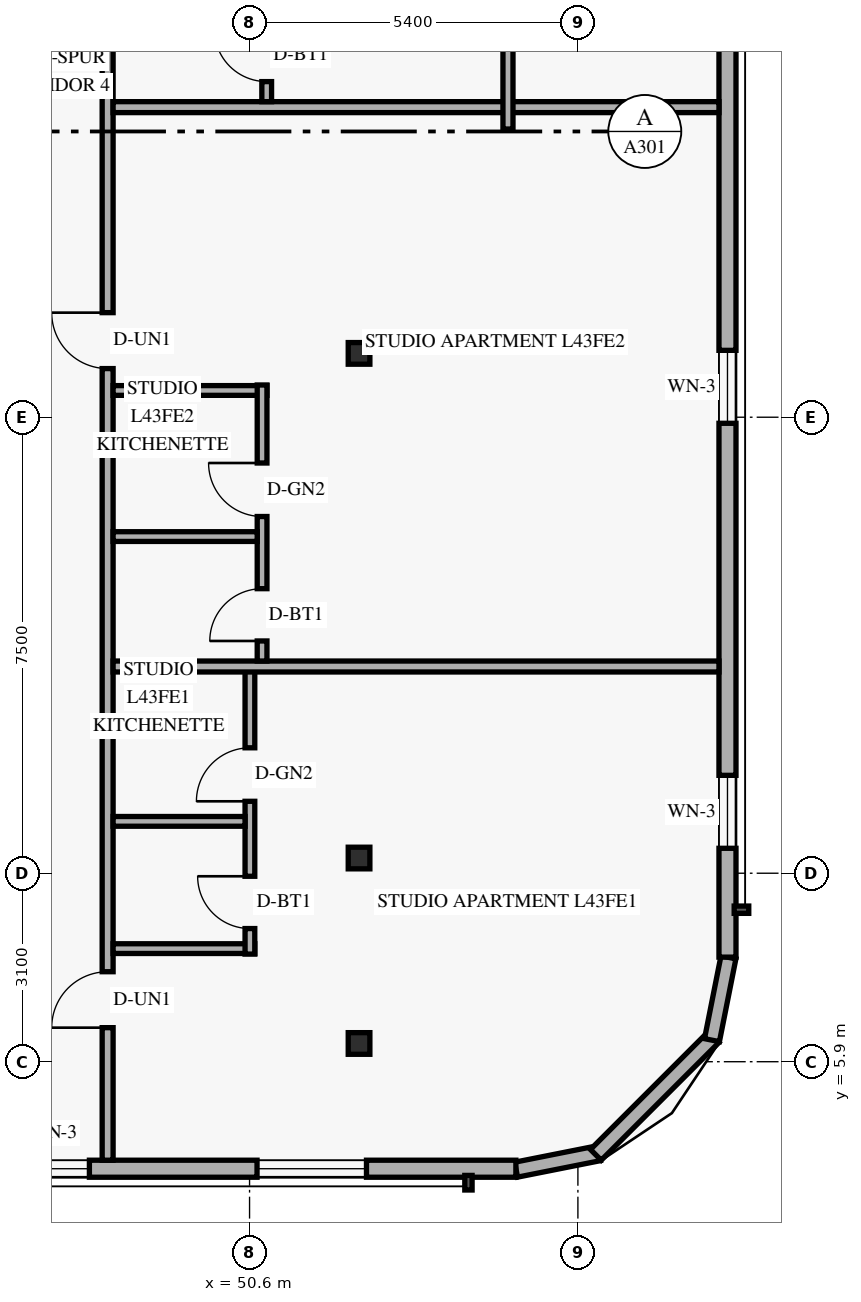
"""IFC4 building model, lengths in metres.
Left out: names, types, materials, properties, quantities, classifications, styles, units other than length and angle.
Written with IfcOpenShell. Run it as: python <this file> out.ifc"""

import sys

from ifc_helpers import new_model, si_unit, direction, frame, frame_2d, origin, origin_2d, place, context, subcontext, project, spatial, rectangle, hollow_rectangle, extrude, element, fill, save


model = new_model("IFC4")
c1 = context("Model", 3, precision=1e-05, world=origin(), true_north=direction((0.0, 1.0)))
c2 = subcontext(c1, "Body", "Model", "MODEL_VIEW")
j1 = project(units=[si_unit("LENGTHUNIT", "METRE"), si_unit("PLANEANGLEUNIT", "RADIAN")], contexts=[c1])
p1 = place(None, origin())
s1 = spatial("IfcSite", under=j1, at=p1, CompositionType="ELEMENT")
p2 = place(p1, origin())
s2 = spatial("IfcBuilding", under=s1, at=p2, CompositionType="ELEMENT")
p3 = place(p2, frame((0.0, 0.0, 166.2)))
s3 = spatial("IfcBuildingStorey", under=s2, at=p3, CompositionType="ELEMENT", Elevation=166.2)
for number, where, z_axis, x_axis in (
    (1, (52.296, 6.2, 0.0), (0.058, 0.0, 0.998), (0.0, 1.0, 0.0)),
    (2, (52.296, 9.25, 0.0), (0.058, 0.0, 0.998), (0.0, 1.0, 0.0)),
    (3, (52.296, 17.55, 0.0), (0.058, 0.0, 0.998), (0.0, 1.0, 0.0)),
):
    element("IfcColumn", number, at=place(p3, frame(where, z_axis=z_axis, x_axis=x_axis)), inside=s3, PredefinedType="COLUMN", context=c2, shape_type="SweptSolid", body=[
        extrude(hollow_rectangle(XDim=0.356, YDim=0.356, WallThickness=0.016, at=origin_2d()), origin(), (0.0, 0.0, 1.0), 3.606),
    ])
p4 = place(p3, frame((54.983, 4.124, 0.0), z_axis=(0.0, 0.0, 1.0), x_axis=(0.980809899341, 0.19496651342, 0.0)))
e4 = element("IfcWall", 4, at=p4, inside=s3, PredefinedType="SOLIDWALL", context=c2, shape_type="SweptSolid", body=[
    extrude(rectangle(XDim=1.389, YDim=0.25, at=frame_2d((0.694, 0.0))), origin(), (0.0, 0.0, 1.0), 3.36),
])
p5 = place(p3, frame((56.295, 4.368, 0.0), z_axis=(0.0, 0.0, 1.0), x_axis=(0.707106781187, 0.707106781187, 0.0)))
e5 = element("IfcWall", 5, at=p5, inside=s3, PredefinedType="SOLIDWALL", context=c2, shape_type="SweptSolid", body=[
    extrude(rectangle(XDim=2.739, YDim=0.25, at=frame_2d((1.37, 0.0))), origin(), (0.0, 0.0, 1.0), 3.36),
])
p6 = place(p3, frame((58.205, 6.254, 0.0), z_axis=(0.0, 0.0, 1.0), x_axis=(0.19496651342, 0.980809899341, 0.0)))
e6 = element("IfcWall", 6, at=p6, inside=s3, PredefinedType="SOLIDWALL", context=c2, shape_type="SweptSolid", body=[
    extrude(rectangle(XDim=1.389, YDim=0.25, at=frame_2d((0.694, 0.0))), origin(), (0.0, 0.0, 1.0), 3.36),
])
p7 = place(p3, frame((21.22, 4.14, 0.0), z_axis=(0.0, 0.0, 1.0), x_axis=(1.0, 0.0, 0.0)))
e7 = element("IfcWall", 7, at=p7, inside=s3, PredefinedType="SOLIDWALL", context=c2, shape_type="SweptSolid", body=[
    extrude(rectangle(XDim=33.76, YDim=0.28, at=frame_2d((16.88, 0.0))), origin(), (0.0, 0.0, 1.0), 3.36),
])
p8 = place(p7, frame((2.255, 0.0, 0.85)))
e8 = element("IfcOpeningElement", 8, at=p8, cuts=e7, PredefinedType="OPENING", context=c2, shape_type="SweptSolid", body=[
    extrude(rectangle(XDim=1.8, YDim=1.6, at=frame_2d((0.9, 0.8))), frame((0.0, 0.15, 0.0), z_axis=(0.0, -1.0, 0.0), x_axis=(1.0, 0.0, 0.0)), (0.0, 0.0, 1.0), 0.3),
])
p9 = place(p7, frame((9.14, 0.0, 0.85)))
e9 = element("IfcOpeningElement", 9, at=p9, cuts=e7, PredefinedType="OPENING", context=c2, shape_type="SweptSolid", body=[
    extrude(rectangle(XDim=1.8, YDim=1.6, at=frame_2d((0.9, 0.8))), frame((0.0, 0.15, 0.0), z_axis=(0.0, -1.0, 0.0), x_axis=(1.0, 0.0, 0.0)), (0.0, 0.0, 1.0), 0.3),
])
p10 = place(p7, frame((14.565, 0.0, 0.85)))
e10 = element("IfcOpeningElement", 10, at=p10, cuts=e7, PredefinedType="OPENING", context=c2, shape_type="SweptSolid", body=[
    extrude(rectangle(XDim=1.8, YDim=1.6, at=frame_2d((0.9, 0.8))), frame((0.0, 0.15, 0.0), z_axis=(0.0, -1.0, 0.0), x_axis=(1.0, 0.0, 0.0)), (0.0, 0.0, 1.0), 0.3),
])
p11 = place(p7, frame((20.088, 0.0, 0.85)))
e11 = element("IfcOpeningElement", 11, at=p11, cuts=e7, PredefinedType="OPENING", context=c2, shape_type="SweptSolid", body=[
    extrude(rectangle(XDim=1.8, YDim=1.6, at=frame_2d((0.9, 0.8))), frame((0.0, 0.15, 0.0), z_axis=(0.0, -1.0, 0.0), x_axis=(1.0, 0.0, 0.0)), (0.0, 0.0, 1.0), 0.3),
])
p12 = place(p7, frame((25.546, 0.0, 0.85)))
e12 = element("IfcOpeningElement", 12, at=p12, cuts=e7, PredefinedType="OPENING", context=c2, shape_type="SweptSolid", body=[
    extrude(rectangle(XDim=1.2, YDim=1.5, at=frame_2d((0.6, 0.75))), frame((0.0, 0.15, 0.0), z_axis=(0.0, -1.0, 0.0), x_axis=(1.0, 0.0, 0.0)), (0.0, 0.0, 1.0), 0.3),
])
p13 = place(p7, frame((29.503, 0.0, 0.85)))
e13 = element("IfcOpeningElement", 13, at=p13, cuts=e7, PredefinedType="OPENING", context=c2, shape_type="SweptSolid", body=[
    extrude(rectangle(XDim=1.8, YDim=1.6, at=frame_2d((0.9, 0.8))), frame((0.0, 0.15, 0.0), z_axis=(0.0, -1.0, 0.0), x_axis=(1.0, 0.0, 0.0)), (0.0, 0.0, 1.0), 0.3),
])
p14 = place(p3, frame((58.46, 7.62, 0.0), z_axis=(0.0, 0.0, 1.0), x_axis=(0.0, 1.0, 0.0)))
e14 = element("IfcWall", 14, at=p14, inside=s3, PredefinedType="SOLIDWALL", context=c2, shape_type="SweptSolid", body=[
    extrude(rectangle(XDim=32.76, YDim=0.28, at=frame_2d((16.38, 0.0))), origin(), (0.0, 0.0, 1.0), 3.36),
])
p15 = place(p14, frame((1.79, 0.0, 0.85)))
e15 = element("IfcOpeningElement", 15, at=p15, cuts=e14, PredefinedType="OPENING", context=c2, shape_type="SweptSolid", body=[
    extrude(rectangle(XDim=1.2, YDim=1.5, at=frame_2d((0.6, 0.75))), frame((0.0, 0.15, 0.0), z_axis=(0.0, -1.0, 0.0), x_axis=(1.0, 0.0, 0.0)), (0.0, 0.0, 1.0), 0.3),
])
p16 = place(p14, frame((8.78, 0.0, 0.85)))
e16 = element("IfcOpeningElement", 16, at=p16, cuts=e14, PredefinedType="OPENING", context=c2, shape_type="SweptSolid", body=[
    extrude(rectangle(XDim=1.2, YDim=1.5, at=frame_2d((0.6, 0.75))), frame((0.0, 0.15, 0.0), z_axis=(0.0, -1.0, 0.0), x_axis=(1.0, 0.0, 0.0)), (0.0, 0.0, 1.0), 0.3),
])
p17 = place(p14, frame((16.325, 0.0, 0.85)))
e17 = element("IfcOpeningElement", 17, at=p17, cuts=e14, PredefinedType="OPENING", context=c2, shape_type="SweptSolid", body=[
    extrude(rectangle(XDim=1.2, YDim=1.5, at=frame_2d((0.6, 0.75))), frame((0.0, 0.15, 0.0), z_axis=(0.0, -1.0, 0.0), x_axis=(1.0, 0.0, 0.0)), (0.0, 0.0, 1.0), 0.3),
])
p18 = place(p14, frame((21.325, 0.0, 0.85)))
e18 = element("IfcOpeningElement", 18, at=p18, cuts=e14, PredefinedType="OPENING", context=c2, shape_type="SweptSolid", body=[
    extrude(rectangle(XDim=1.2, YDim=1.5, at=frame_2d((0.6, 0.75))), frame((0.0, 0.15, 0.0), z_axis=(0.0, -1.0, 0.0), x_axis=(1.0, 0.0, 0.0)), (0.0, 0.0, 1.0), 0.3),
])
p19 = place(p14, frame((26.58, 0.0, 0.85)))
e19 = element("IfcOpeningElement", 19, at=p19, cuts=e14, PredefinedType="OPENING", context=c2, shape_type="SweptSolid", body=[
    extrude(rectangle(XDim=1.2, YDim=1.5, at=frame_2d((0.6, 0.75))), frame((0.0, 0.15, 0.0), z_axis=(0.0, -1.0, 0.0), x_axis=(1.0, 0.0, 0.0)), (0.0, 0.0, 1.0), 0.3),
])
p20 = place(p14, frame((30.97, 0.0, 0.85)))
e20 = element("IfcOpeningElement", 20, at=p20, cuts=e14, PredefinedType="OPENING", context=c2, shape_type="SweptSolid", body=[
    extrude(rectangle(XDim=1.2, YDim=1.5, at=frame_2d((0.6, 0.75))), frame((0.0, 0.15, 0.0), z_axis=(0.0, -1.0, 0.0), x_axis=(1.0, 0.0, 0.0)), (0.0, 0.0, 1.0), 0.3),
])
p21 = place(p3, frame((48.266, 4.28, 0.0), z_axis=(0.0, 0.0, 1.0), x_axis=(0.0, 1.0, 0.0)))
e21 = element("IfcWall", 21, at=p21, inside=s3, PredefinedType="STANDARD", context=c2, shape_type="SweptSolid", body=[
    extrude(rectangle(XDim=39.44, YDim=0.18, at=frame_2d((19.72, 0.0))), origin(), (0.0, 0.0, 1.0), 2.73),
])
p22 = place(p21, frame((2.18, 0.0, 0.0)))
e22 = element("IfcOpeningElement", 22, at=p22, cuts=e21, PredefinedType="OPENING", context=c2, shape_type="SweptSolid", body=[
    extrude(rectangle(XDim=0.92, YDim=2.15, at=frame_2d((0.46, 1.075))), frame((0.0, 0.1, 0.0), z_axis=(0.0, -1.0, 0.0), x_axis=(1.0, 0.0, 0.0)), (0.0, 0.0, 1.0), 0.2),
])
p23 = place(p21, frame((13.02, 0.0, 0.0)))
e23 = element("IfcOpeningElement", 23, at=p23, cuts=e21, PredefinedType="OPENING", context=c2, shape_type="SweptSolid", body=[
    extrude(rectangle(XDim=0.92, YDim=2.15, at=frame_2d((0.46, 1.075))), frame((0.0, 0.1, 0.0), z_axis=(0.0, -1.0, 0.0), x_axis=(1.0, 0.0, 0.0)), (0.0, 0.0, 1.0), 0.2),
])
p24 = place(p21, frame((22.32, 0.0, 0.0)))
e24 = element("IfcOpeningElement", 24, at=p24, cuts=e21, PredefinedType="OPENING", context=c2, shape_type="SweptSolid", body=[
    extrude(rectangle(XDim=0.92, YDim=2.15, at=frame_2d((0.46, 1.075))), frame((0.0, 0.1, 0.0), z_axis=(0.0, -1.0, 0.0), x_axis=(1.0, 0.0, 0.0)), (0.0, 0.0, 1.0), 0.2),
])
p25 = place(p21, frame((32.12, 0.0, 0.0)))
e25 = element("IfcOpeningElement", 25, at=p25, cuts=e21, PredefinedType="OPENING", context=c2, shape_type="SweptSolid", body=[
    extrude(rectangle(XDim=0.92, YDim=2.15, at=frame_2d((0.46, 1.075))), frame((0.0, 0.1, 0.0), z_axis=(0.0, -1.0, 0.0), x_axis=(1.0, 0.0, 0.0)), (0.0, 0.0, 1.0), 0.2),
])
p26 = place(p21, frame((38.2, 0.0, 0.0)))
e26 = element("IfcOpeningElement", 26, at=p26, cuts=e21, PredefinedType="OPENING", context=c2, shape_type="SweptSolid", body=[
    extrude(rectangle(XDim=0.92, YDim=2.15, at=frame_2d((0.46, 1.075))), frame((0.0, 0.1, 0.0), z_axis=(0.0, -1.0, 0.0), x_axis=(1.0, 0.0, 0.0)), (0.0, 0.0, 1.0), 0.2),
])
p27 = place(p3, frame((48.356, 7.76, 0.0), z_axis=(0.0, 0.0, 1.0), x_axis=(1.0, 0.0, 0.0)))
e27 = element("IfcWall", 27, at=p27, inside=s3, PredefinedType="PLUMBINGWALL", context=c2, shape_type="SweptSolid", body=[
    extrude(rectangle(XDim=2.33, YDim=0.16, at=frame_2d((1.165, 0.0))), origin(), (0.0, 0.0, 1.0), 3.36),
])
p28 = place(p3, frame((50.606, 7.67, 0.0), z_axis=(0.0, 0.0, 1.0), x_axis=(0.0, 1.0, 0.0)))
e28 = element("IfcWall", 28, at=p28, inside=s3, PredefinedType="PLUMBINGWALL", context=c2, shape_type="SweptSolid", body=[
    extrude(rectangle(XDim=4.73, YDim=0.16, at=frame_2d((2.365, 0.0))), origin(), (0.0, 0.0, 1.0), 2.73),
])
p29 = place(p28, frame((0.42, 0.0, 0.0)))
e29 = element("IfcOpeningElement", 29, at=p29, cuts=e28, PredefinedType="OPENING", context=c2, shape_type="SweptSolid", body=[
    extrude(rectangle(XDim=0.86, YDim=2.12, at=frame_2d((0.43, 1.06))), frame((0.0, 0.09, 0.0), z_axis=(0.0, -1.0, 0.0), x_axis=(1.0, 0.0, 0.0)), (0.0, 0.0, 1.0), 0.18),
])
p30 = place(p28, frame((2.513, 0.0, 0.0)))
e30 = element("IfcOpeningElement", 30, at=p30, cuts=e28, PredefinedType="OPENING", context=c2, shape_type="SweptSolid", body=[
    extrude(rectangle(XDim=0.88, YDim=2.12, at=frame_2d((0.44, 1.06))), frame((0.0, 0.09, 0.0), z_axis=(0.0, -1.0, 0.0), x_axis=(1.0, 0.0, 0.0)), (0.0, 0.0, 1.0), 0.18),
])
p31 = place(p3, frame((48.356, 9.853, 0.0), z_axis=(0.0, 0.0, 1.0), x_axis=(1.0, 0.0, 0.0)))
e31 = element("IfcWall", 31, at=p31, inside=s3, PredefinedType="PLUMBINGWALL", context=c2, shape_type="SweptSolid", body=[
    extrude(rectangle(XDim=2.17, YDim=0.16, at=frame_2d((1.085, 0.0))), origin(), (0.0, 0.0, 1.0), 3.36),
])
p32 = place(p3, frame((48.356, 12.4, 0.0), z_axis=(0.0, 0.0, 1.0), x_axis=(1.0, 0.0, 0.0)))
e32 = element("IfcWall", 32, at=p32, inside=s3, PredefinedType="PARTITIONING", context=c2, shape_type="SweptSolid", body=[
    extrude(rectangle(XDim=9.964, YDim=0.18, at=frame_2d((4.982, 0.0))), origin(), (0.0, 0.0, 1.0), 2.879),
])
p33 = place(p3, frame((48.356, 16.94, 0.0), z_axis=(0.0, 0.0, 1.0), x_axis=(1.0, 0.0, 0.0)))
e33 = element("IfcWall", 33, at=p33, inside=s3, PredefinedType="PLUMBINGWALL", context=c2, shape_type="SweptSolid", body=[
    extrude(rectangle(XDim=2.53, YDim=0.16, at=frame_2d((1.265, 0.0))), origin(), (0.0, 0.0, 1.0), 3.36),
])
p34 = place(p3, frame((50.806, 12.49, 0.0), z_axis=(0.0, 0.0, 1.0), x_axis=(0.0, 1.0, 0.0)))
e34 = element("IfcWall", 34, at=p34, inside=s3, PredefinedType="PLUMBINGWALL", context=c2, shape_type="SweptSolid", body=[
    extrude(rectangle(XDim=4.54, YDim=0.16, at=frame_2d((2.27, 0.0))), origin(), (0.0, 0.0, 1.0), 2.984),
])
p35 = place(p34, frame((0.33, 0.0, 0.0)))
e35 = element("IfcOpeningElement", 35, at=p35, cuts=e34, PredefinedType="OPENING", context=c2, shape_type="SweptSolid", body=[
    extrude(rectangle(XDim=0.86, YDim=2.12, at=frame_2d((0.43, 1.06))), frame((0.0, 0.09, 0.0), z_axis=(0.0, -1.0, 0.0), x_axis=(1.0, 0.0, 0.0)), (0.0, 0.0, 1.0), 0.18),
])
p36 = place(p34, frame((2.377, 0.0, 0.0)))
e36 = element("IfcOpeningElement", 36, at=p36, cuts=e34, PredefinedType="OPENING", context=c2, shape_type="SweptSolid", body=[
    extrude(rectangle(XDim=0.88, YDim=2.12, at=frame_2d((0.44, 1.06))), frame((0.0, 0.09, 0.0), z_axis=(0.0, -1.0, 0.0), x_axis=(1.0, 0.0, 0.0)), (0.0, 0.0, 1.0), 0.18),
])
p37 = place(p3, frame((48.356, 14.537, 0.0), z_axis=(0.0, 0.0, 1.0), x_axis=(1.0, 0.0, 0.0)))
e37 = element("IfcWall", 37, at=p37, inside=s3, PredefinedType="PLUMBINGWALL", context=c2, shape_type="SweptSolid", body=[
    extrude(rectangle(XDim=2.37, YDim=0.16, at=frame_2d((1.185, 0.0))), origin(), (0.0, 0.0, 1.0), 3.36),
])
p38 = place(p3, frame((48.356, 21.6, 0.0), z_axis=(0.0, 0.0, 1.0), x_axis=(1.0, 0.0, 0.0)))
e38 = element("IfcWall", 38, at=p38, inside=s3, PredefinedType="PARTITIONING", context=c2, shape_type="SweptSolid", body=[
    extrude(rectangle(XDim=9.964, YDim=0.18, at=frame_2d((4.982, 0.0))), origin(), (0.0, 0.0, 1.0), 2.879),
])
p39 = place(p3, frame((50.882, 21.69, 0.0), z_axis=(0.0, 0.0, 1.0), x_axis=(0.0, 1.0, 0.0)))
e39 = element("IfcWall", 39, at=p39, inside=s3, PredefinedType="PLUMBINGWALL", context=c2, shape_type="SweptSolid", body=[
    extrude(rectangle(XDim=4.64, YDim=0.16, at=frame_2d((2.32, 0.0))), origin(), (0.0, 0.0, 1.0), 3.36),
])
p40 = place(p39, frame((0.33, 0.0, 0.0)))
e40 = element("IfcOpeningElement", 40, at=p40, cuts=e39, PredefinedType="OPENING", context=c2, shape_type="SweptSolid", body=[
    extrude(rectangle(XDim=0.86, YDim=2.12, at=frame_2d((0.43, 1.06))), frame((0.0, 0.09, 0.0), z_axis=(0.0, -1.0, 0.0), x_axis=(1.0, 0.0, 0.0)), (0.0, 0.0, 1.0), 0.18),
])
p41 = place(p39, frame((2.423, 0.0, 0.0)))
e41 = element("IfcOpeningElement", 41, at=p41, cuts=e39, PredefinedType="OPENING", context=c2, shape_type="SweptSolid", body=[
    extrude(rectangle(XDim=0.88, YDim=2.12, at=frame_2d((0.44, 1.06))), frame((0.0, 0.09, 0.0), z_axis=(0.0, -1.0, 0.0), x_axis=(1.0, 0.0, 0.0)), (0.0, 0.0, 1.0), 0.18),
])
p42 = place(p3, frame((54.85, 21.24, 0.0), z_axis=(0.0, 0.0, 1.0), x_axis=(0.0, 1.0, 0.0)))
e42 = element("IfcWall", 42, at=p42, inside=s3, PredefinedType="PARTITIONING", context=c2, shape_type="SweptSolid", body=[
    extrude(rectangle(XDim=6.25, YDim=0.165, at=frame_2d((3.125, 0.0))), origin(), (0.0, 0.0, 1.0), 3.36),
])
p43 = place(p12, origin())
e43 = element("IfcWindow", 43, at=p43, inside=s3, PartitioningType="SINGLE_PANEL", PredefinedType="WINDOW", context=c2, shape_type="SweptSolid", body=[
    extrude(rectangle(XDim=1.2, YDim=1.5, at=frame_2d((0.6, 0.75))), frame((0.0, 0.03, 0.0), z_axis=(0.0, -1.0, 0.0), x_axis=(1.0, 0.0, 0.0)), (0.0, 0.0, 1.0), 0.06),
])
fill(e12, e43)
p44 = place(p13, origin())
e44 = element("IfcWindow", 44, at=p44, inside=s3, PartitioningType="SINGLE_PANEL", PredefinedType="WINDOW", context=c2, shape_type="SweptSolid", body=[
    extrude(rectangle(XDim=1.8, YDim=1.6, at=frame_2d((0.9, 0.8))), frame((0.0, 0.03, 0.0), z_axis=(0.0, -1.0, 0.0), x_axis=(1.0, 0.0, 0.0)), (0.0, 0.0, 1.0), 0.06),
])
fill(e13, e44)
p45 = place(p15, origin())
e45 = element("IfcWindow", 45, at=p45, inside=s3, PartitioningType="SINGLE_PANEL", PredefinedType="WINDOW", context=c2, shape_type="SweptSolid", body=[
    extrude(rectangle(XDim=1.2, YDim=1.5, at=frame_2d((0.6, 0.75))), frame((0.0, 0.03, 0.0), z_axis=(0.0, -1.0, 0.0), x_axis=(1.0, 0.0, 0.0)), (0.0, 0.0, 1.0), 0.06),
])
fill(e15, e45)
p46 = place(p16, origin())
e46 = element("IfcWindow", 46, at=p46, inside=s3, PartitioningType="SINGLE_PANEL", PredefinedType="WINDOW", context=c2, shape_type="SweptSolid", body=[
    extrude(rectangle(XDim=1.2, YDim=1.5, at=frame_2d((0.6, 0.75))), frame((0.0, 0.03, 0.0), z_axis=(0.0, -1.0, 0.0), x_axis=(1.0, 0.0, 0.0)), (0.0, 0.0, 1.0), 0.06),
])
fill(e16, e46)
p47 = place(p22, origin())
e47 = element("IfcDoor", 47, at=p47, inside=s3, OperationType="SINGLE_SWING_LEFT", PredefinedType="DOOR", context=c2, shape_type="SweptSolid", body=[
    extrude(rectangle(XDim=0.92, YDim=2.15, at=frame_2d((0.46, 1.075))), frame((0.0, 0.025, 0.0), z_axis=(0.0, -1.0, 0.0), x_axis=(1.0, 0.0, 0.0)), (0.0, 0.0, 1.0), 0.05),
])
fill(e22, e47)
p48 = place(p29, origin())
e48 = element("IfcDoor", 48, at=p48, inside=s3, OperationType="SINGLE_SWING_RIGHT", PredefinedType="DOOR", context=c2, shape_type="SweptSolid", body=[
    extrude(rectangle(XDim=0.86, YDim=2.12, at=frame_2d((0.43, 1.06))), frame((0.0, 0.025, 0.0), z_axis=(0.0, -1.0, 0.0), x_axis=(1.0, 0.0, 0.0)), (0.0, 0.0, 1.0), 0.05),
])
fill(e29, e48)
p49 = place(p30, origin())
e49 = element("IfcDoor", 49, at=p49, inside=s3, OperationType="SINGLE_SWING_LEFT", PredefinedType="DOOR", context=c2, shape_type="SweptSolid", body=[
    extrude(rectangle(XDim=0.88, YDim=2.12, at=frame_2d((0.44, 1.06))), frame((0.0, 0.025, 0.0), z_axis=(0.0, -1.0, 0.0), x_axis=(1.0, 0.0, 0.0)), (0.0, 0.0, 1.0), 0.05),
])
fill(e30, e49)
p50 = place(p23, origin())
e50 = element("IfcDoor", 50, at=p50, inside=s3, OperationType="SINGLE_SWING_RIGHT", PredefinedType="DOOR", context=c2, shape_type="SweptSolid", body=[
    extrude(rectangle(XDim=0.92, YDim=2.15, at=frame_2d((0.46, 1.075))), frame((0.0, 0.025, 0.0), z_axis=(0.0, -1.0, 0.0), x_axis=(1.0, 0.0, 0.0)), (0.0, 0.0, 1.0), 0.05),
])
fill(e23, e50)
p51 = place(p35, origin())
e51 = element("IfcDoor", 51, at=p51, inside=s3, OperationType="SINGLE_SWING_LEFT", PredefinedType="DOOR", context=c2, shape_type="SweptSolid", body=[
    extrude(rectangle(XDim=0.86, YDim=2.12, at=frame_2d((0.43, 1.06))), frame((0.0, 0.025, 0.0), z_axis=(0.0, -1.0, 0.0), x_axis=(1.0, 0.0, 0.0)), (0.0, 0.0, 1.0), 0.05),
])
fill(e35, e51)
p52 = place(p36, origin())
e52 = element("IfcDoor", 52, at=p52, inside=s3, OperationType="SINGLE_SWING_RIGHT", PredefinedType="DOOR", context=c2, shape_type="SweptSolid", body=[
    extrude(rectangle(XDim=0.88, YDim=2.12, at=frame_2d((0.44, 1.06))), frame((0.0, 0.025, 0.0), z_axis=(0.0, -1.0, 0.0), x_axis=(1.0, 0.0, 0.0)), (0.0, 0.0, 1.0), 0.05),
])
fill(e36, e52)
p53 = place(p40, origin())
e53 = element("IfcDoor", 53, at=p53, inside=s3, OperationType="SINGLE_SWING_RIGHT", PredefinedType="DOOR", context=c2, shape_type="SweptSolid", body=[
    extrude(rectangle(XDim=0.86, YDim=2.12, at=frame_2d((0.43, 1.06))), frame((0.0, 0.025, 0.0), z_axis=(0.0, -1.0, 0.0), x_axis=(1.0, 0.0, 0.0)), (0.0, 0.0, 1.0), 0.05),
])
fill(e40, e53)
save(model, sys.argv[1])
